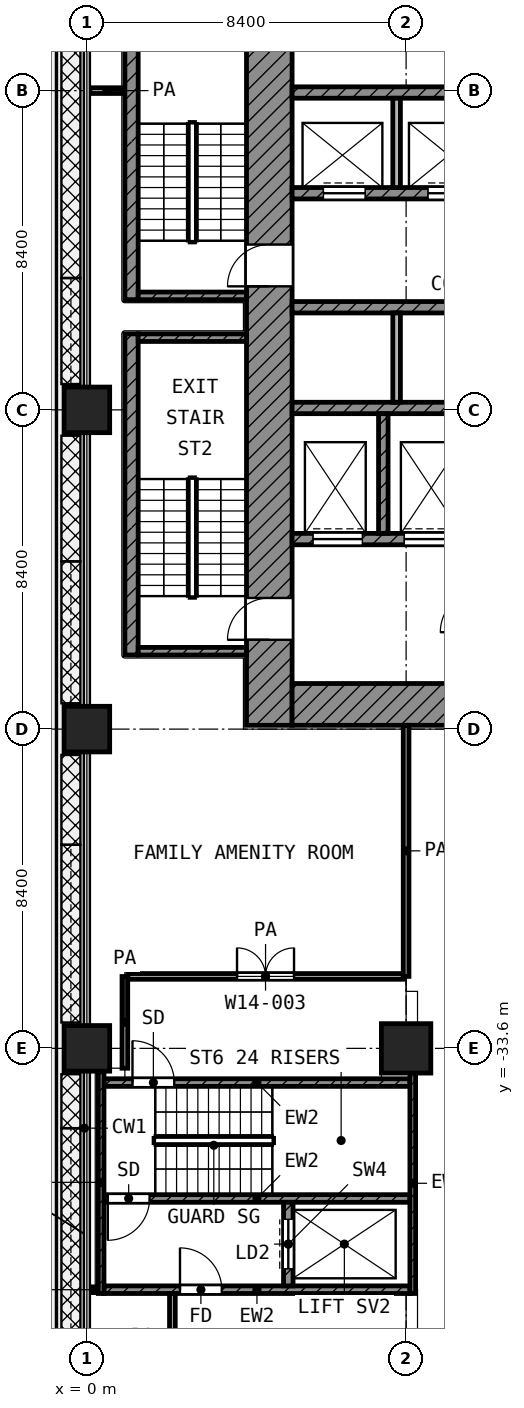
"""IFC4 building model, lengths in metres.
Left out: names, types, materials, properties, quantities, classifications, styles, units other than length and angle.
Written with IfcOpenShell. Run it as: python <this file> out.ifc"""

import sys

from ifc_helpers import new_model, si_unit, direction, frame, frame_2d, origin, origin_2d, place, context, subcontext, project, spatial, rectangle, extrude, element, fill, save


model = new_model("IFC4")
c1 = context("Model", 3, precision=1e-05, world=origin(), true_north=direction((0.0, 1.0)))
c2 = subcontext(c1, "Body", "Model", "MODEL_VIEW")
j1 = project(units=[si_unit("LENGTHUNIT", "METRE"), si_unit("PLANEANGLEUNIT", "RADIAN")], contexts=[c1])
p1 = place(None, origin())
s1 = spatial("IfcSite", under=j1, at=p1, CompositionType="ELEMENT")
p2 = place(p1, origin())
s2 = spatial("IfcBuilding", under=s1, at=p2, CompositionType="ELEMENT")
p3 = place(p2, frame((0.0, 0.0, 64.4)))
s3 = spatial("IfcBuildingStorey", under=s2, at=p3, CompositionType="ELEMENT", Elevation=64.4)
for number, where, z_axis, x_axis in (
    (1, (0.0, -16.8, 0.0), (0.0, 0.0, 1.0), (1.0, 0.0, 0.0)),
    (2, (0.0, -25.2, 0.0), (0.0, 0.0, 1.0), (1.0, 0.0, 0.0)),
    (3, (0.0, -33.6, 0.0), (0.0, 0.0, 1.0), (1.0, 0.0, 0.0)),
):
    element("IfcColumn", number, at=place(p3, frame(where, z_axis=z_axis, x_axis=x_axis)), inside=s3, PredefinedType="COLUMN", context=c2, shape_type="SweptSolid", body=[
        extrude(rectangle(XDim=1.2, YDim=1.2, at=origin_2d()), origin(), (0.0, 0.0, 1.0), 4.2),
    ])
p4 = place(p3, frame((8.4, -33.6, 0.0), z_axis=(0.0, 0.0, 1.0), x_axis=(1.0, 0.0, 0.0)))
e4 = element("IfcColumn", 4, at=p4, inside=s3, PredefinedType="COLUMN", context=c2, shape_type="SweptSolid", body=[
    extrude(rectangle(XDim=1.3, YDim=1.3, at=origin_2d()), origin(), (0.0, 0.0, 1.0), 4.2),
])
p5 = place(p3, frame((4.8, -25.1, 0.0), z_axis=(0.0, 0.0, 1.0), x_axis=(0.0, 1.0, 0.0)))
e5 = element("IfcWall", 5, at=p5, inside=s3, PredefinedType="SHEAR", context=c2, shape_type="SweptSolid", body=[
    extrude(rectangle(XDim=19.7, YDim=1.2, at=frame_2d((9.85, 0.0))), origin(), (0.0, 0.0, 1.0), 3.9),
])
p6 = place(p5, frame((11.55, 0.0, 0.0)))
e6 = element("IfcOpeningElement", 6, at=p6, cuts=e5, PredefinedType="OPENING", context=c2, shape_type="SweptSolid", body=[
    extrude(rectangle(XDim=1.1, YDim=2.1, at=frame_2d((0.55, 1.05))), frame((0.0, 0.61, 0.0), z_axis=(0.0, -1.0, 0.0), x_axis=(1.0, 0.0, 0.0)), (0.0, 0.0, 1.0), 1.22),
])
p7 = place(p5, frame((2.25, 0.0, 0.0)))
e7 = element("IfcOpeningElement", 7, at=p7, cuts=e5, PredefinedType="OPENING", context=c2, shape_type="SweptSolid", body=[
    extrude(rectangle(XDim=1.1, YDim=2.1, at=frame_2d((0.55, 1.05))), frame((0.0, 0.61, 0.0), z_axis=(0.0, -1.0, 0.0), x_axis=(1.0, 0.0, 0.0)), (0.0, 0.0, 1.0), 1.22),
])
p8 = place(p3, frame((5.4, -24.55, 0.0), z_axis=(0.0, 0.0, 1.0), x_axis=(1.0, 0.0, 0.0)))
e8 = element("IfcWall", 8, at=p8, inside=s3, PredefinedType="SHEAR", context=c2, shape_type="SweptSolid", body=[
    extrude(rectangle(XDim=18.6, YDim=1.1, at=frame_2d((9.3, 0.0))), origin(), (0.0, 0.0, 1.0), 3.9),
])
p9 = place(p8, frame((6.3, 0.0, 0.0)))
e9 = element("IfcOpeningElement", 9, at=p9, cuts=e8, PredefinedType="OPENING", context=c2, shape_type="SweptSolid", body=[
    extrude(rectangle(XDim=1.8, YDim=2.1, at=frame_2d((0.9, 1.05))), frame((0.0, 0.56, 0.0), z_axis=(0.0, -1.0, 0.0), x_axis=(1.0, 0.0, 0.0)), (0.0, 0.0, 1.0), 1.12),
])
p10 = place(p3, frame((5.4, -8.45, 0.0), z_axis=(0.0, 0.0, 1.0), x_axis=(1.0, 0.0, 0.0)))
e10 = element("IfcWall", 10, at=p10, inside=s3, PredefinedType="SHEAR", context=c2, shape_type="SweptSolid", body=[
    extrude(rectangle(XDim=16.65, YDim=0.3, at=frame_2d((8.325, 0.0))), origin(), (0.0, 0.0, 1.0), 3.9),
])
p11 = place(p3, frame((5.4, -11.1, 0.0), z_axis=(0.0, 0.0, 1.0), x_axis=(1.0, 0.0, 0.0)))
e11 = element("IfcWall", 11, at=p11, inside=s3, PredefinedType="SHEAR", context=c2, shape_type="SweptSolid", body=[
    extrude(rectangle(XDim=16.65, YDim=0.3, at=frame_2d((8.325, 0.0))), origin(), (0.0, 0.0, 1.0), 3.9),
])
p12 = place(p11, frame((0.825, 0.0, 0.0)))
e12 = element("IfcOpeningElement", 12, at=p12, cuts=e11, PredefinedType="OPENING", context=c2, shape_type="SweptSolid", body=[
    extrude(rectangle(XDim=1.1, YDim=2.1, at=frame_2d((0.55, 1.05))), frame((0.0, 0.16, 0.0), z_axis=(0.0, -1.0, 0.0), x_axis=(1.0, 0.0, 0.0)), (0.0, 0.0, 1.0), 0.32),
])
p13 = place(p11, frame((3.575, 0.0, 0.0)))
e13 = element("IfcOpeningElement", 13, at=p13, cuts=e11, PredefinedType="OPENING", context=c2, shape_type="SweptSolid", body=[
    extrude(rectangle(XDim=1.1, YDim=2.1, at=frame_2d((0.55, 1.05))), frame((0.0, 0.16, 0.0), z_axis=(0.0, -1.0, 0.0), x_axis=(1.0, 0.0, 0.0)), (0.0, 0.0, 1.0), 0.32),
])
p14 = place(p11, frame((6.325, 0.0, 0.0)))
e14 = element("IfcOpeningElement", 14, at=p14, cuts=e11, PredefinedType="OPENING", context=c2, shape_type="SweptSolid", body=[
    extrude(rectangle(XDim=1.1, YDim=2.1, at=frame_2d((0.55, 1.05))), frame((0.0, 0.16, 0.0), z_axis=(0.0, -1.0, 0.0), x_axis=(1.0, 0.0, 0.0)), (0.0, 0.0, 1.0), 0.32),
])
p15 = place(p11, frame((9.075, 0.0, 0.0)))
e15 = element("IfcOpeningElement", 15, at=p15, cuts=e11, PredefinedType="OPENING", context=c2, shape_type="SweptSolid", body=[
    extrude(rectangle(XDim=1.1, YDim=2.1, at=frame_2d((0.55, 1.05))), frame((0.0, 0.16, 0.0), z_axis=(0.0, -1.0, 0.0), x_axis=(1.0, 0.0, 0.0)), (0.0, 0.0, 1.0), 0.32),
])
for number, where, z_axis, x_axis in (
    (16, (5.4, -14.1, 0.0), (0.0, 0.0, 1.0), (1.0, 0.0, 0.0)),
    (17, (5.4, -16.75, 0.0), (0.0, 0.0, 1.0), (1.0, 0.0, 0.0)),
):
    element("IfcWall", number, at=place(p3, frame(where, z_axis=z_axis, x_axis=x_axis)), inside=s3, PredefinedType="SHEAR", context=c2, shape_type="SweptSolid", body=[
        extrude(rectangle(XDim=16.65, YDim=0.3, at=frame_2d((8.325, 0.0))), origin(), (0.0, 0.0, 1.0), 3.9),
    ])
p16 = place(p3, frame((5.4, -20.2, 0.0), z_axis=(0.0, 0.0, 1.0), x_axis=(1.0, 0.0, 0.0)))
e18 = element("IfcWall", 18, at=p16, inside=s3, PredefinedType="SHEAR", context=c2, shape_type="SweptSolid", body=[
    extrude(rectangle(XDim=14.65, YDim=0.3, at=frame_2d((7.325, 0.0))), origin(), (0.0, 0.0, 1.0), 3.9),
])
p17 = place(p16, frame((10.55, 0.0, 0.0)))
e19 = element("IfcOpeningElement", 19, at=p17, cuts=e18, PredefinedType="OPENING", context=c2, shape_type="SweptSolid", body=[
    extrude(rectangle(XDim=1.3, YDim=2.1, at=frame_2d((0.65, 1.05))), frame((0.0, 0.16, 0.0), z_axis=(0.0, -1.0, 0.0), x_axis=(1.0, 0.0, 0.0)), (0.0, 0.0, 1.0), 0.32),
])
p18 = place(p16, frame((12.95, 0.0, 0.0)))
e20 = element("IfcOpeningElement", 20, at=p18, cuts=e18, PredefinedType="OPENING", context=c2, shape_type="SweptSolid", body=[
    extrude(rectangle(XDim=1.3, YDim=2.1, at=frame_2d((0.65, 1.05))), frame((0.0, 0.16, 0.0), z_axis=(0.0, -1.0, 0.0), x_axis=(1.0, 0.0, 0.0)), (0.0, 0.0, 1.0), 0.32),
])
p19 = place(p16, frame((0.55, 0.0, 0.0)))
e21 = element("IfcOpeningElement", 21, at=p19, cuts=e18, PredefinedType="OPENING", context=c2, shape_type="SweptSolid", body=[
    extrude(rectangle(XDim=1.3, YDim=2.1, at=frame_2d((0.65, 1.05))), frame((0.0, 0.16, 0.0), z_axis=(0.0, -1.0, 0.0), x_axis=(1.0, 0.0, 0.0)), (0.0, 0.0, 1.0), 0.32),
])
p20 = place(p16, frame((2.95, 0.0, 0.0)))
e22 = element("IfcOpeningElement", 22, at=p20, cuts=e18, PredefinedType="OPENING", context=c2, shape_type="SweptSolid", body=[
    extrude(rectangle(XDim=1.3, YDim=2.1, at=frame_2d((0.65, 1.05))), frame((0.0, 0.16, 0.0), z_axis=(0.0, -1.0, 0.0), x_axis=(1.0, 0.0, 0.0)), (0.0, 0.0, 1.0), 0.32),
])
p21 = place(p16, frame((5.35, 0.0, 0.0)))
e23 = element("IfcOpeningElement", 23, at=p21, cuts=e18, PredefinedType="OPENING", context=c2, shape_type="SweptSolid", body=[
    extrude(rectangle(XDim=0.9, YDim=2.1, at=frame_2d((0.45, 1.05))), frame((0.0, 0.16, 0.0), z_axis=(0.0, -1.0, 0.0), x_axis=(1.0, 0.0, 0.0)), (0.0, 0.0, 1.0), 0.32),
])
p22 = place(p16, frame((7.75, 0.0, 0.0)))
e24 = element("IfcOpeningElement", 24, at=p22, cuts=e18, PredefinedType="OPENING", context=c2, shape_type="SweptSolid", body=[
    extrude(rectangle(XDim=0.9, YDim=2.1, at=frame_2d((0.45, 1.05))), frame((0.0, 0.16, 0.0), z_axis=(0.0, -1.0, 0.0), x_axis=(1.0, 0.0, 0.0)), (0.0, 0.0, 1.0), 0.32),
])
p23 = place(p3, frame((7.8, -20.05, 0.0), z_axis=(0.0, 0.0, 1.0), x_axis=(0.0, 1.0, 0.0)))
e25 = element("IfcWall", 25, at=p23, inside=s3, PredefinedType="SHEAR", context=c2, shape_type="SweptSolid", body=[
    extrude(rectangle(XDim=3.15, YDim=0.25, at=frame_2d((1.575, 0.0))), origin(), (0.0, 0.0, 1.0), 3.9),
])
p24 = place(p3, frame((8.15, -10.95, 0.0), z_axis=(0.0, 0.0, 1.0), x_axis=(0.0, 1.0, 0.0)))
e26 = element("IfcWall", 26, at=p24, inside=s3, PredefinedType="PARTITIONING", context=c2, shape_type="SweptSolid", body=[
    extrude(rectangle(XDim=2.35, YDim=0.2, at=frame_2d((1.175, 0.0))), origin(), (0.0, 0.0, 1.0), 3.9),
])
p25 = place(p3, frame((8.15, -16.6, 0.0), z_axis=(0.0, 0.0, 1.0), x_axis=(0.0, 1.0, 0.0)))
e27 = element("IfcWall", 27, at=p25, inside=s3, PredefinedType="PARTITIONING", context=c2, shape_type="SweptSolid", body=[
    extrude(rectangle(XDim=2.35, YDim=0.2, at=frame_2d((1.175, 0.0))), origin(), (0.0, 0.0, 1.0), 3.9),
])
p26 = place(p3, frame((1.175, -13.9, 0.0), z_axis=(0.0, 0.0, 1.0), x_axis=(0.0, 1.0, 0.0)))
e28 = element("IfcWall", 28, at=p26, inside=s3, PredefinedType="SHEAR", context=c2, shape_type="SweptSolid", body=[
    extrude(rectangle(XDim=8.45, YDim=0.35, at=frame_2d((4.225, 0.0))), origin(), (0.0, 0.0, 1.0), 3.9),
])
p27 = place(p3, frame((1.35, -13.8, 0.0), z_axis=(0.0, 0.0, 1.0), x_axis=(1.0, 0.0, 0.0)))
e29 = element("IfcWall", 29, at=p27, inside=s3, PredefinedType="SHEAR", context=c2, shape_type="SweptSolid", body=[
    extrude(rectangle(XDim=2.85, YDim=0.2, at=frame_2d((1.425, 0.0))), origin(), (0.0, 0.0, 1.0), 3.9),
])
p28 = place(p3, frame((1.175, -23.25, 0.0), z_axis=(0.0, 0.0, 1.0), x_axis=(0.0, 1.0, 0.0)))
e30 = element("IfcWall", 30, at=p28, inside=s3, PredefinedType="SHEAR", context=c2, shape_type="SweptSolid", body=[
    extrude(rectangle(XDim=8.45, YDim=0.35, at=frame_2d((4.225, 0.0))), origin(), (0.0, 0.0, 1.0), 3.9),
])
for number, where, z_axis, x_axis in (
    (31, (1.35, -14.9, 0.0), (0.0, 0.0, 1.0), (1.0, 0.0, 0.0)),
    (32, (1.35, -23.15, 0.0), (0.0, 0.0, 1.0), (1.0, 0.0, 0.0)),
):
    element("IfcWall", number, at=place(p3, frame(where, z_axis=z_axis, x_axis=x_axis)), inside=s3, PredefinedType="SHEAR", context=c2, shape_type="SweptSolid", body=[
        extrude(rectangle(XDim=2.85, YDim=0.2, at=frame_2d((1.425, 0.0))), origin(), (0.0, 0.0, 1.0), 3.9),
    ])
p29 = place(p3, frame((0.375, -40.05, 0.0), z_axis=(0.0, 0.0, 1.0), x_axis=(0.0, 1.0, 0.0)))
e33 = element("IfcWall", 33, at=p29, inside=s3, PredefinedType="SHEAR", context=c2, shape_type="SweptSolid", body=[
    extrude(rectangle(XDim=5.85, YDim=0.15, at=frame_2d((2.925, 0.0))), origin(), (0.0, 0.0, 1.0), 3.9),
])
p30 = place(p3, frame((8.575, -40.05, 0.0), z_axis=(0.0, 0.0, 1.0), x_axis=(0.0, 1.0, 0.0)))
e34 = element("IfcWall", 34, at=p30, inside=s3, PredefinedType="SHEAR", context=c2, shape_type="SweptSolid", body=[
    extrude(rectangle(XDim=5.8, YDim=0.15, at=frame_2d((2.9, 0.0))), origin(), (0.0, 0.0, 1.0), 3.9),
])
p31 = place(p3, frame((0.45, -34.5, 0.0), z_axis=(0.0, 0.0, 1.0), x_axis=(1.0, 0.0, 0.0)))
e35 = element("IfcWall", 35, at=p31, inside=s3, PredefinedType="SHEAR", context=c2, shape_type="SweptSolid", body=[
    extrude(rectangle(XDim=8.05, YDim=0.2, at=frame_2d((4.025, 0.0))), origin(), (0.0, 0.0, 1.0), 3.9),
])
p32 = place(p31, frame((0.75, 0.0, 0.0)))
e36 = element("IfcOpeningElement", 36, at=p32, cuts=e35, PredefinedType="OPENING", context=c2, shape_type="SweptSolid", body=[
    extrude(rectangle(XDim=1.1, YDim=2.1, at=frame_2d((0.55, 1.05))), frame((0.0, 0.11, 0.0), z_axis=(0.0, -1.0, 0.0), x_axis=(1.0, 0.0, 0.0)), (0.0, 0.0, 1.0), 0.22),
])
p33 = place(p3, frame((0.45, -37.55, 0.0), z_axis=(0.0, 0.0, 1.0), x_axis=(1.0, 0.0, 0.0)))
e37 = element("IfcWall", 37, at=p33, inside=s3, PredefinedType="SHEAR", context=c2, shape_type="SweptSolid", body=[
    extrude(rectangle(XDim=8.05, YDim=0.2, at=frame_2d((4.025, 0.0))), origin(), (0.0, 0.0, 1.0), 3.9),
])
p34 = place(p33, frame((0.1, 0.0, 0.0)))
e38 = element("IfcOpeningElement", 38, at=p34, cuts=e37, PredefinedType="OPENING", context=c2, shape_type="SweptSolid", body=[
    extrude(rectangle(XDim=1.1, YDim=2.1, at=frame_2d((0.55, 1.05))), frame((0.0, 0.11, 0.0), z_axis=(0.0, -1.0, 0.0), x_axis=(1.0, 0.0, 0.0)), (0.0, 0.0, 1.0), 0.22),
])
p35 = place(p3, frame((0.45, -39.95, 0.0), z_axis=(0.0, 0.0, 1.0), x_axis=(1.0, 0.0, 0.0)))
e39 = element("IfcWall", 39, at=p35, inside=s3, PredefinedType="SHEAR", context=c2, shape_type="SweptSolid", body=[
    extrude(rectangle(XDim=8.05, YDim=0.2, at=frame_2d((4.025, 0.0))), origin(), (0.0, 0.0, 1.0), 3.9),
])
p36 = place(p35, frame((2.0, 0.0, 0.0)))
e40 = element("IfcOpeningElement", 40, at=p36, cuts=e39, PredefinedType="OPENING", context=c2, shape_type="SweptSolid", body=[
    extrude(rectangle(XDim=1.1, YDim=2.1, at=frame_2d((0.55, 1.05))), frame((0.0, 0.11, 0.0), z_axis=(0.0, -1.0, 0.0), x_axis=(1.0, 0.0, 0.0)), (0.0, 0.0, 1.0), 0.22),
])
p37 = place(p3, frame((5.3, -39.85, 0.0), z_axis=(0.0, 0.0, 1.0), x_axis=(0.0, 1.0, 0.0)))
e41 = element("IfcWall", 41, at=p37, inside=s3, PredefinedType="SHEAR", context=c2, shape_type="SweptSolid", body=[
    extrude(rectangle(XDim=2.2, YDim=0.25, at=frame_2d((1.1, 0.0))), origin(), (0.0, 0.0, 1.0), 3.9),
])
p38 = place(p37, frame((0.45, 0.0, 0.0)))
e42 = element("IfcOpeningElement", 42, at=p38, cuts=e41, PredefinedType="OPENING", context=c2, shape_type="SweptSolid", body=[
    extrude(rectangle(XDim=1.3, YDim=2.1, at=frame_2d((0.65, 1.05))), frame((0.0, 0.135, 0.0), z_axis=(0.0, -1.0, 0.0), x_axis=(1.0, 0.0, 0.0)), (0.0, 0.0, 1.0), 0.27),
])
p39 = place(p3, frame((0.08, -39.95, 0.0), z_axis=(0.0, 0.0, 1.0), x_axis=(1.0, 0.0, 0.0)))
e43 = element("IfcWall", 43, at=p39, inside=s3, PredefinedType="PARTITIONING", context=c2, shape_type="SweptSolid", body=[
    extrude(rectangle(XDim=0.19, YDim=0.15, at=frame_2d((0.095, 0.0))), origin(), (0.0, 0.0, 1.0), 3.9),
])
p40 = place(p3, frame((1.078, -31.707, 0.0), z_axis=(0.0, 0.0, 1.0), x_axis=(1.0, 0.0, 0.0)))
e44 = element("IfcWall", 44, at=p40, inside=s3, PredefinedType="PARTITIONING", context=c2, shape_type="SweptSolid", body=[
    extrude(rectangle(XDim=7.247, YDim=0.15, at=frame_2d((3.624, 0.0))), origin(), (0.0, 0.0, 1.0), 3.9),
])
p41 = place(p40, frame((2.873, 0.0, 0.0)))
e45 = element("IfcOpeningElement", 45, at=p41, cuts=e44, PredefinedType="OPENING", context=c2, shape_type="SweptSolid", body=[
    extrude(rectangle(XDim=1.5, YDim=2.1, at=frame_2d((0.75, 1.05))), frame((0.0, 0.085, 0.0), z_axis=(0.0, -1.0, 0.0), x_axis=(1.0, 0.0, 0.0)), (0.0, 0.0, 1.0), 0.17),
])
p42 = place(p3, frame((0.08, -8.4, 0.0), z_axis=(0.0, 0.0, 1.0), x_axis=(1.0, 0.0, 0.0)))
e46 = element("IfcWall", 46, at=p42, inside=s3, PredefinedType="PARTITIONING", context=c2, shape_type="SweptSolid", body=[
    extrude(rectangle(XDim=0.89, YDim=0.15, at=frame_2d((0.445, 0.0))), origin(), (0.0, 0.0, 1.0), 3.9),
])
p43 = place(p3, frame((1.0, -34.123, 0.0), z_axis=(0.0, 0.0, 1.0), x_axis=(0.0, 1.0, 0.0)))
e47 = element("IfcWall", 47, at=p43, inside=s3, PredefinedType="PARTITIONING", context=c2, shape_type="SweptSolid", body=[
    extrude(rectangle(XDim=2.414, YDim=0.15, at=frame_2d((1.207, 0.0))), origin(), (0.0, 0.0, 1.0), 3.9),
])
p44 = place(p3, frame((2.25, -42.348, 0.0), z_axis=(0.0, 0.0, 1.0), x_axis=(0.0, 1.0, 0.0)))
e48 = element("IfcWall", 48, at=p44, inside=s3, PredefinedType="PARTITIONING", context=c2, shape_type="SweptSolid", body=[
    extrude(rectangle(XDim=2.298, YDim=0.15, at=frame_2d((1.149, 0.0))), origin(), (0.0, 0.0, 1.0), 3.9),
])
p45 = place(p3, frame((8.4, -31.707, 0.0), z_axis=(0.0, 0.0, 1.0), x_axis=(0.0, 1.0, 0.0)))
e49 = element("IfcWall", 49, at=p45, inside=s3, PredefinedType="PARTITIONING", context=c2, shape_type="SweptSolid", body=[
    extrude(rectangle(XDim=6.607, YDim=0.15, at=frame_2d((3.303, 0.0))), origin(), (0.0, 0.0, 1.0), 3.9),
])
p46 = place(p12, origin())
e50 = element("IfcDoor", 50, at=p46, inside=s3, OperationType="DOUBLE_DOOR_SLIDING", PredefinedType="DOOR", context=c2, shape_type="SweptSolid", body=[
    extrude(rectangle(XDim=1.1, YDim=2.1, at=frame_2d((0.55, 1.05))), frame((0.0, 0.025, 0.0), z_axis=(0.0, -1.0, 0.0), x_axis=(1.0, 0.0, 0.0)), (0.0, 0.0, 1.0), 0.05),
])
fill(e12, e50)
p47 = place(p13, origin())
e51 = element("IfcDoor", 51, at=p47, inside=s3, OperationType="DOUBLE_DOOR_SLIDING", PredefinedType="DOOR", context=c2, shape_type="SweptSolid", body=[
    extrude(rectangle(XDim=1.1, YDim=2.1, at=frame_2d((0.55, 1.05))), frame((0.0, 0.025, 0.0), z_axis=(0.0, -1.0, 0.0), x_axis=(1.0, 0.0, 0.0)), (0.0, 0.0, 1.0), 0.05),
])
fill(e13, e51)
p48 = place(p19, origin())
e52 = element("IfcDoor", 52, at=p48, inside=s3, OperationType="DOUBLE_DOOR_SLIDING", PredefinedType="DOOR", context=c2, shape_type="SweptSolid", body=[
    extrude(rectangle(XDim=1.3, YDim=2.1, at=frame_2d((0.65, 1.05))), frame((0.0, 0.025, 0.0), z_axis=(0.0, -1.0, 0.0), x_axis=(1.0, 0.0, 0.0)), (0.0, 0.0, 1.0), 0.05),
])
fill(e21, e52)
p49 = place(p20, origin())
e53 = element("IfcDoor", 53, at=p49, inside=s3, OperationType="DOUBLE_DOOR_SLIDING", PredefinedType="DOOR", context=c2, shape_type="SweptSolid", body=[
    extrude(rectangle(XDim=1.3, YDim=2.1, at=frame_2d((0.65, 1.05))), frame((0.0, 0.025, 0.0), z_axis=(0.0, -1.0, 0.0), x_axis=(1.0, 0.0, 0.0)), (0.0, 0.0, 1.0), 0.05),
])
fill(e22, e53)
p50 = place(p6, origin())
e54 = element("IfcDoor", 54, at=p50, inside=s3, OperationType="SINGLE_SWING_LEFT", PredefinedType="DOOR", context=c2, shape_type="SweptSolid", body=[
    extrude(rectangle(XDim=1.1, YDim=2.1, at=frame_2d((0.55, 1.05))), frame((0.0, 0.025, 0.0), z_axis=(0.0, -1.0, 0.0), x_axis=(1.0, 0.0, 0.0)), (0.0, 0.0, 1.0), 0.05),
])
fill(e6, e54)
p51 = place(p7, origin())
e55 = element("IfcDoor", 55, at=p51, inside=s3, OperationType="SINGLE_SWING_LEFT", PredefinedType="DOOR", context=c2, shape_type="SweptSolid", body=[
    extrude(rectangle(XDim=1.1, YDim=2.1, at=frame_2d((0.55, 1.05))), frame((0.0, 0.025, 0.0), z_axis=(0.0, -1.0, 0.0), x_axis=(1.0, 0.0, 0.0)), (0.0, 0.0, 1.0), 0.05),
])
fill(e7, e55)
p52 = place(p32, origin())
e56 = element("IfcDoor", 56, at=p52, inside=s3, OperationType="SINGLE_SWING_LEFT", PredefinedType="DOOR", context=c2, shape_type="SweptSolid", body=[
    extrude(rectangle(XDim=1.1, YDim=2.1, at=frame_2d((0.55, 1.05))), frame((0.0, 0.025, 0.0), z_axis=(0.0, -1.0, 0.0), x_axis=(1.0, 0.0, 0.0)), (0.0, 0.0, 1.0), 0.05),
])
fill(e36, e56)
p53 = place(p34, frame((1.1, 0.0, 0.0), z_axis=(0.0, 0.0, 1.0), x_axis=(-1.0, 0.0, 0.0)))
e57 = element("IfcDoor", 57, at=p53, inside=s3, OperationType="SINGLE_SWING_LEFT", PredefinedType="DOOR", context=c2, shape_type="SweptSolid", body=[
    extrude(rectangle(XDim=1.1, YDim=2.1, at=frame_2d((0.55, 1.05))), frame((0.0, 0.025, 0.0), z_axis=(0.0, -1.0, 0.0), x_axis=(1.0, 0.0, 0.0)), (0.0, 0.0, 1.0), 0.05),
])
fill(e38, e57)
p54 = place(p38, origin())
e58 = element("IfcDoor", 58, at=p54, inside=s3, OperationType="DOUBLE_DOOR_SLIDING", PredefinedType="DOOR", context=c2, shape_type="SweptSolid", body=[
    extrude(rectangle(XDim=1.3, YDim=2.1, at=frame_2d((0.65, 1.05))), frame((0.0, 0.025, 0.0), z_axis=(0.0, -1.0, 0.0), x_axis=(1.0, 0.0, 0.0)), (0.0, 0.0, 1.0), 0.05),
])
fill(e42, e58)
p55 = place(p36, origin())
e59 = element("IfcDoor", 59, at=p55, inside=s3, OperationType="SINGLE_SWING_LEFT", PredefinedType="DOOR", context=c2, shape_type="SweptSolid", body=[
    extrude(rectangle(XDim=1.1, YDim=2.1, at=frame_2d((0.55, 1.05))), frame((0.0, 0.025, 0.0), z_axis=(0.0, -1.0, 0.0), x_axis=(1.0, 0.0, 0.0)), (0.0, 0.0, 1.0), 0.05),
])
fill(e40, e59)
p56 = place(p41, origin())
e60 = element("IfcDoor", 60, at=p56, inside=s3, OperationType="DOUBLE_DOOR_SINGLE_SWING", PredefinedType="DOOR", context=c2, shape_type="SweptSolid", body=[
    extrude(rectangle(XDim=1.5, YDim=2.1, at=frame_2d((0.75, 1.05))), frame((0.0, 0.025, 0.0), z_axis=(0.0, -1.0, 0.0), x_axis=(1.0, 0.0, 0.0)), (0.0, 0.0, 1.0), 0.05),
])
fill(e45, e60)
save(model, sys.argv[1])
